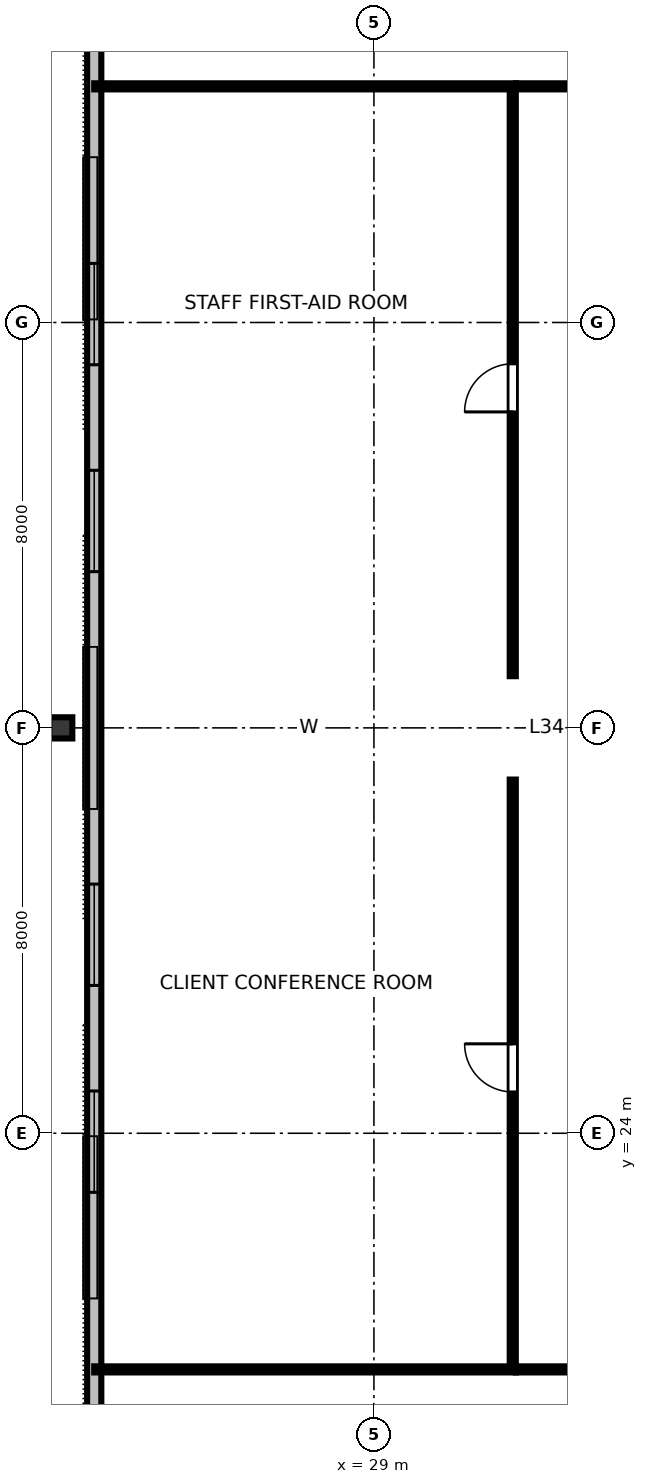
"""IFC4 building model, lengths in metres.
Left out: names, types, materials, properties, quantities, classifications, styles, units other than length and angle.
Written with IfcOpenShell. Run it as: python <this file> out.ifc"""

import sys

from ifc_helpers import new_model, si_unit, direction, frame, frame_2d, origin, origin_2d, place, context, subcontext, project, spatial, rectangle, i_section, extrude, element, fill, save


model = new_model("IFC4")
c1 = context("Model", 3, precision=1e-05, world=origin(), true_north=direction((0.0, 1.0)))
c2 = subcontext(c1, "Body", "Model", "MODEL_VIEW")
j1 = project(units=[si_unit("LENGTHUNIT", "METRE"), si_unit("PLANEANGLEUNIT", "RADIAN")], contexts=[c1])
p1 = place(None, origin())
s1 = spatial("IfcSite", under=j1, at=p1, CompositionType="ELEMENT")
p2 = place(p1, origin())
s2 = spatial("IfcBuilding", under=s1, at=p2, CompositionType="ELEMENT")
p3 = place(p2, frame((0.0, 0.0, 131.2)))
s3 = spatial("IfcBuildingStorey", under=s2, at=p3, CompositionType="ELEMENT", Elevation=131.2)
p4 = place(p3, frame((22.82, 32.0, 0.0), z_axis=(0.0, 0.0, 1.0), x_axis=(0.0, 1.0, 0.0)))
e1 = element("IfcColumn", 1, at=p4, inside=s3, PredefinedType="COLUMN", context=c2, shape_type="SweptSolid", body=[
    extrude(i_section(OverallWidth=0.418, OverallDepth=0.455, WebThickness=0.042, FlangeThickness=0.068, FilletRadius=0.025, at=origin_2d()), origin(), (0.0, 0.0, 1.0), 3.358),
])
p5 = place(p3, frame((23.48, 47.39, 0.0), z_axis=(0.0, 0.0, 1.0), x_axis=(0.0, -1.0, 0.0)))
e2 = element("IfcWall", 2, at=p5, inside=s3, PredefinedType="STANDARD", context=c2, shape_type="SweptSolid", body=[
    extrude(rectangle(XDim=30.78, YDim=0.28, at=frame_2d((15.39, 0.0))), origin(), (0.0, 0.0, 1.0), 3.36),
])
p6 = place(p5, frame((6.224, 0.0, 0.8)))
e3 = element("IfcOpeningElement", 3, at=p6, cuts=e2, PredefinedType="OPENING", context=c2, shape_type="SweptSolid", body=[
    extrude(rectangle(XDim=2.0, YDim=1.95, at=frame_2d((1.0, 0.975))), frame((0.0, 0.15, 0.0), z_axis=(0.0, -1.0, 0.0), x_axis=(1.0, 0.0, 0.0)), (0.0, 0.0, 1.0), 0.3),
])
p7 = place(p5, frame((10.307, 0.0, 0.8)))
e4 = element("IfcOpeningElement", 4, at=p7, cuts=e2, PredefinedType="OPENING", context=c2, shape_type="SweptSolid", body=[
    extrude(rectangle(XDim=2.0, YDim=1.95, at=frame_2d((1.0, 0.975))), frame((0.0, 0.15, 0.0), z_axis=(0.0, -1.0, 0.0), x_axis=(1.0, 0.0, 0.0)), (0.0, 0.0, 1.0), 0.3),
])
p8 = place(p5, frame((18.473, 0.0, 0.8)))
e5 = element("IfcOpeningElement", 5, at=p8, cuts=e2, PredefinedType="OPENING", context=c2, shape_type="SweptSolid", body=[
    extrude(rectangle(XDim=2.0, YDim=1.95, at=frame_2d((1.0, 0.975))), frame((0.0, 0.15, 0.0), z_axis=(0.0, -1.0, 0.0), x_axis=(1.0, 0.0, 0.0)), (0.0, 0.0, 1.0), 0.3),
])
p9 = place(p5, frame((22.556, 0.0, 0.8)))
e6 = element("IfcOpeningElement", 6, at=p9, cuts=e2, PredefinedType="OPENING", context=c2, shape_type="SweptSolid", body=[
    extrude(rectangle(XDim=2.0, YDim=1.95, at=frame_2d((1.0, 0.975))), frame((0.0, 0.15, 0.0), z_axis=(0.0, -1.0, 0.0), x_axis=(1.0, 0.0, 0.0)), (0.0, 0.0, 1.0), 0.3),
])
p10 = place(p3, frame((31.8, 19.34, 0.0), z_axis=(0.0, 0.0, 1.0), x_axis=(1.0, 0.0, 0.0)))
e7 = element("IfcWall", 7, at=p10, inside=s3, PredefinedType="PARTITIONING", context=c2, shape_type="SweptSolid", body=[
    extrude(rectangle(XDim=28.4, YDim=0.12, at=frame_2d((14.2, 0.0))), origin(), (0.0, 0.0, 1.0), 2.64),
])
p11 = place(p10, frame((4.955, 0.0, 0.0)))
e8 = element("IfcOpeningElement", 8, at=p11, cuts=e7, PredefinedType="OPENING", context=c2, shape_type="SweptSolid", body=[
    extrude(rectangle(XDim=0.95, YDim=2.15, at=frame_2d((0.475, 1.075))), frame((0.0, 0.07, 0.0), z_axis=(0.0, -1.0, 0.0), x_axis=(1.0, 0.0, 0.0)), (0.0, 0.0, 1.0), 0.14),
])
p12 = place(p10, frame((19.015, 0.0, 0.0)))
e9 = element("IfcOpeningElement", 9, at=p12, cuts=e7, PredefinedType="OPENING", context=c2, shape_type="SweptSolid", body=[
    extrude(rectangle(XDim=0.95, YDim=2.15, at=frame_2d((0.475, 1.075))), frame((0.0, 0.07, 0.0), z_axis=(0.0, -1.0, 0.0), x_axis=(1.0, 0.0, 0.0)), (0.0, 0.0, 1.0), 0.14),
])
p13 = place(p3, frame((31.8, 44.66, 0.0), z_axis=(0.0, 0.0, 1.0), x_axis=(1.0, 0.0, 0.0)))
e10 = element("IfcWall", 10, at=p13, inside=s3, PredefinedType="PARTITIONING", context=c2, shape_type="SweptSolid", body=[
    extrude(rectangle(XDim=28.4, YDim=0.12, at=frame_2d((14.2, 0.0))), origin(), (0.0, 0.0, 1.0), 2.64),
])
p14 = place(p13, frame((4.544, 0.0, 0.0)))
e11 = element("IfcOpeningElement", 11, at=p14, cuts=e10, PredefinedType="OPENING", context=c2, shape_type="SweptSolid", body=[
    extrude(rectangle(XDim=0.95, YDim=2.15, at=frame_2d((0.475, 1.075))), frame((0.0, 0.07, 0.0), z_axis=(0.0, -1.0, 0.0), x_axis=(1.0, 0.0, 0.0)), (0.0, 0.0, 1.0), 0.14),
])
p15 = place(p13, frame((11.807, 0.0, 0.0)))
e12 = element("IfcOpeningElement", 12, at=p15, cuts=e10, PredefinedType="OPENING", context=c2, shape_type="SweptSolid", body=[
    extrude(rectangle(XDim=0.95, YDim=2.15, at=frame_2d((0.475, 1.075))), frame((0.0, 0.07, 0.0), z_axis=(0.0, -1.0, 0.0), x_axis=(1.0, 0.0, 0.0)), (0.0, 0.0, 1.0), 0.14),
])
p16 = place(p13, frame((17.048, 0.0, 0.0)))
e13 = element("IfcOpeningElement", 13, at=p16, cuts=e10, PredefinedType="OPENING", context=c2, shape_type="SweptSolid", body=[
    extrude(rectangle(XDim=0.95, YDim=2.15, at=frame_2d((0.475, 1.075))), frame((0.0, 0.07, 0.0), z_axis=(0.0, -1.0, 0.0), x_axis=(1.0, 0.0, 0.0)), (0.0, 0.0, 1.0), 0.14),
])
p17 = place(p13, frame((23.845, 0.0, 0.0)))
e14 = element("IfcOpeningElement", 14, at=p17, cuts=e10, PredefinedType="OPENING", context=c2, shape_type="SweptSolid", body=[
    extrude(rectangle(XDim=0.95, YDim=2.15, at=frame_2d((0.475, 1.075))), frame((0.0, 0.07, 0.0), z_axis=(0.0, -1.0, 0.0), x_axis=(1.0, 0.0, 0.0)), (0.0, 0.0, 1.0), 0.14),
])
p18 = place(p3, frame((31.74, 19.4, 0.0), z_axis=(0.0, 0.0, 1.0), x_axis=(0.0, 1.0, 0.0)))
e15 = element("IfcWall", 15, at=p18, inside=s3, PredefinedType="PARTITIONING", context=c2, shape_type="SweptSolid", body=[
    extrude(rectangle(XDim=11.58, YDim=0.12, at=frame_2d((5.79, 0.0))), origin(), (0.0, 0.0, 1.0), 2.64),
])
p19 = place(p18, frame((5.415, 0.0, 0.0)))
e16 = element("IfcOpeningElement", 16, at=p19, cuts=e15, PredefinedType="OPENING", context=c2, shape_type="SweptSolid", body=[
    extrude(rectangle(XDim=0.95, YDim=2.15, at=frame_2d((0.475, 1.075))), frame((0.0, 0.07, 0.0), z_axis=(0.0, -1.0, 0.0), x_axis=(1.0, 0.0, 0.0)), (0.0, 0.0, 1.0), 0.14),
])
p20 = place(p3, frame((31.74, 33.02, 0.0), z_axis=(0.0, 0.0, 1.0), x_axis=(0.0, 1.0, 0.0)))
e17 = element("IfcWall", 17, at=p20, inside=s3, PredefinedType="PARTITIONING", context=c2, shape_type="SweptSolid", body=[
    extrude(rectangle(XDim=11.58, YDim=0.12, at=frame_2d((5.79, 0.0))), origin(), (0.0, 0.0, 1.0), 2.64),
])
p21 = place(p20, frame((5.215, 0.0, 0.0)))
e18 = element("IfcOpeningElement", 18, at=p21, cuts=e17, PredefinedType="OPENING", context=c2, shape_type="SweptSolid", body=[
    extrude(rectangle(XDim=0.95, YDim=2.15, at=frame_2d((0.475, 1.075))), frame((0.0, 0.07, 0.0), z_axis=(0.0, -1.0, 0.0), x_axis=(1.0, 0.0, 0.0)), (0.0, 0.0, 1.0), 0.14),
])
for number, where, z_axis, x_axis in (
    (19, (31.8, 19.34, 0.0), (0.0, 0.0, 1.0), (-1.0, 0.0, 0.0)),
    (20, (31.8, 44.66, 0.0), (0.0, 0.0, 1.0), (-1.0, 0.0, 0.0)),
):
    element("IfcWall", number, at=place(p3, frame(where, z_axis=z_axis, x_axis=x_axis)), inside=s3, PredefinedType="PARTITIONING", context=c2, shape_type="SweptSolid", body=[
        extrude(rectangle(XDim=8.32, YDim=0.12, at=frame_2d((4.16, 0.0))), origin(), (0.0, 0.0, 1.0), 2.64),
    ])
p22 = place(p6, origin())
e21 = element("IfcWindow", 21, at=p22, inside=s3, PartitioningType="SINGLE_PANEL", PredefinedType="WINDOW", context=c2, shape_type="SweptSolid", body=[
    extrude(rectangle(XDim=2.0, YDim=1.95, at=frame_2d((1.0, 0.975))), frame((0.0, 0.03, 0.0), z_axis=(0.0, -1.0, 0.0), x_axis=(1.0, 0.0, 0.0)), (0.0, 0.0, 1.0), 0.06),
])
fill(e3, e21)
p23 = place(p7, origin())
e22 = element("IfcWindow", 22, at=p23, inside=s3, PartitioningType="SINGLE_PANEL", PredefinedType="WINDOW", context=c2, shape_type="SweptSolid", body=[
    extrude(rectangle(XDim=2.0, YDim=1.95, at=frame_2d((1.0, 0.975))), frame((0.0, 0.03, 0.0), z_axis=(0.0, -1.0, 0.0), x_axis=(1.0, 0.0, 0.0)), (0.0, 0.0, 1.0), 0.06),
])
fill(e4, e22)
p24 = place(p8, origin())
e23 = element("IfcWindow", 23, at=p24, inside=s3, PartitioningType="SINGLE_PANEL", PredefinedType="WINDOW", context=c2, shape_type="SweptSolid", body=[
    extrude(rectangle(XDim=2.0, YDim=1.95, at=frame_2d((1.0, 0.975))), frame((0.0, 0.03, 0.0), z_axis=(0.0, -1.0, 0.0), x_axis=(1.0, 0.0, 0.0)), (0.0, 0.0, 1.0), 0.06),
])
fill(e5, e23)
p25 = place(p9, origin())
e24 = element("IfcWindow", 24, at=p25, inside=s3, PartitioningType="SINGLE_PANEL", PredefinedType="WINDOW", context=c2, shape_type="SweptSolid", body=[
    extrude(rectangle(XDim=2.0, YDim=1.95, at=frame_2d((1.0, 0.975))), frame((0.0, 0.03, 0.0), z_axis=(0.0, -1.0, 0.0), x_axis=(1.0, 0.0, 0.0)), (0.0, 0.0, 1.0), 0.06),
])
fill(e6, e24)
p26 = place(p19, origin())
e25 = element("IfcDoor", 25, at=p26, inside=s3, OperationType="SINGLE_SWING_RIGHT", PredefinedType="DOOR", context=c2, shape_type="SweptSolid", body=[
    extrude(rectangle(XDim=0.95, YDim=2.15, at=frame_2d((0.475, 1.075))), frame((0.0, 0.025, 0.0), z_axis=(0.0, -1.0, 0.0), x_axis=(1.0, 0.0, 0.0)), (0.0, 0.0, 1.0), 0.05),
])
fill(e16, e25)
p27 = place(p21, origin())
e26 = element("IfcDoor", 26, at=p27, inside=s3, OperationType="SINGLE_SWING_LEFT", PredefinedType="DOOR", context=c2, shape_type="SweptSolid", body=[
    extrude(rectangle(XDim=0.95, YDim=2.15, at=frame_2d((0.475, 1.075))), frame((0.0, 0.025, 0.0), z_axis=(0.0, -1.0, 0.0), x_axis=(1.0, 0.0, 0.0)), (0.0, 0.0, 1.0), 0.05),
])
fill(e18, e26)
save(model, sys.argv[1])
